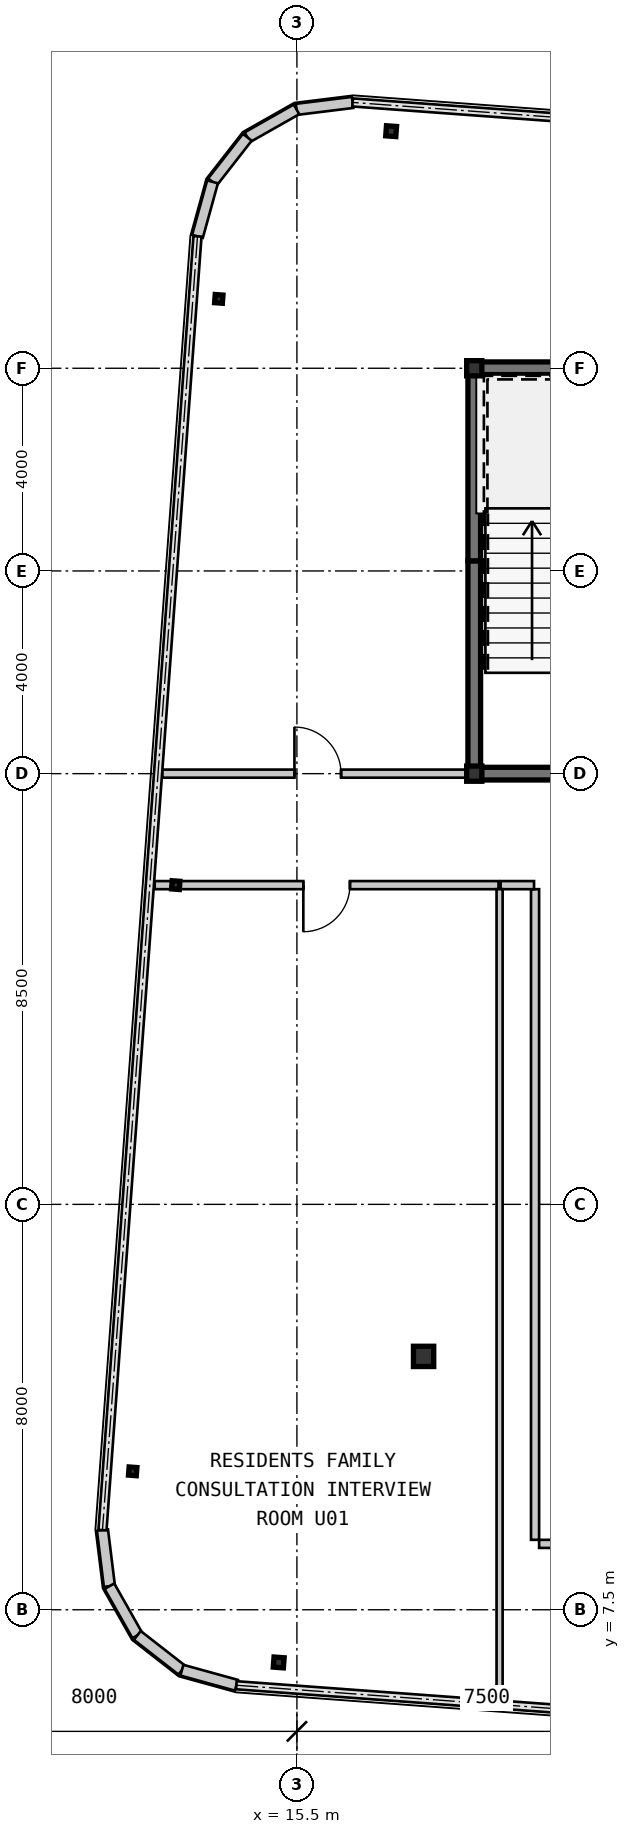
"""IFC4 building model, lengths in metres.
Left out: names, types, materials, properties, quantities, classifications, styles, units other than length and angle.
Written with IfcOpenShell. Run it as: python <this file> out.ifc"""

import sys

from ifc_helpers import new_model, si_unit, direction, frame, frame_2d, origin, origin_2d, place, context, subcontext, project, spatial, rectangle, hollow_rectangle, i_section, extrude, source, transform, mapped, element, fill, save


model = new_model("IFC4")
c1 = context("Model", 3, precision=1e-05, world=origin(), true_north=direction((0.0, 1.0)))
c2 = subcontext(c1, "Body", "Model", "MODEL_VIEW")
j1 = project(units=[si_unit("LENGTHUNIT", "METRE"), si_unit("PLANEANGLEUNIT", "RADIAN")], contexts=[c1])
p1 = place(None, origin())
s1 = spatial("IfcSite", under=j1, at=p1, CompositionType="ELEMENT")
p2 = place(p1, origin())
s2 = spatial("IfcBuilding", under=s1, at=p2, CompositionType="ELEMENT")
p3 = place(p2, frame((0.0, 0.0, 246.05)))
s3 = spatial("IfcBuildingStorey", under=s2, at=p3, CompositionType="ELEMENT", Elevation=246.05)
m1 = source(origin(), c2, "Body", "SweptSolid", [
    extrude(hollow_rectangle(XDim=0.3, YDim=0.3, WallThickness=0.012, at=origin_2d()), origin(), (0.0, 0.0, 1.0), 3.15),
])
for number, where, z_axis, x_axis in (
    (1, (19.0, 24.0, 0.0), (0.0, 0.0, 1.0), (1.0, 0.0, 0.0)),
    (2, (19.0, 32.0, 0.0), (0.0, 0.0, 1.0), (1.0, 0.0, 0.0)),
):
    element("IfcColumn", number, at=place(p3, frame(where, z_axis=z_axis, x_axis=x_axis)), inside=s3, PredefinedType="COLUMN", context=c2, shape_type="MappedRepresentation", body=[
        mapped(m1, transform((0.0, 0.0, 0.0), scale=1.0)),
    ])
m2 = source(origin(), c2, "Body", "SweptSolid", [
    extrude(hollow_rectangle(XDim=0.4, YDim=0.4, WallThickness=0.016, at=origin_2d()), origin(), (0.0, 0.0, 1.0), 3.15),
])
p4 = place(p3, frame((18.0, 12.5, 0.0), z_axis=(0.0, 0.0, 1.0), x_axis=(1.0, 0.0, 0.0)))
e3 = element("IfcColumn", 3, at=p4, inside=s3, PredefinedType="COLUMN", context=c2, shape_type="MappedRepresentation", body=[
    mapped(m2, transform((0.0, 0.0, 0.0), scale=1.0)),
])
m3 = source(origin(), c2, "Body", "SweptSolid", [
    extrude(hollow_rectangle(XDim=0.2, YDim=0.2, WallThickness=0.009, at=origin_2d()), origin(), (0.0, 0.0, 1.0), 3.15),
])
for number, where, z_axis, x_axis in (
    (4, (15.141, 6.46, 0.0), (0.0, 0.0, 1.0), (0.997, -0.073, 0.0)),
    (5, (17.36, 36.679, 0.0), (0.0, 0.0, 1.0), (0.997, -0.073, 0.0)),
):
    element("IfcColumn", number, at=place(p3, frame(where, z_axis=z_axis, x_axis=x_axis)), inside=s3, PredefinedType="COLUMN", context=c2, shape_type="MappedRepresentation", body=[
        mapped(m3, transform((0.0, 0.0, 0.0), scale=1.0)),
    ])
m4 = source(origin(), c2, "Body", "SweptSolid", [
    extrude(i_section(OverallWidth=0.154, OverallDepth=0.162, WebThickness=0.008, FlangeThickness=0.011, at=origin_2d()), origin(), (0.0, 0.0, 1.0), 3.15),
])
for number, where, z_axis, x_axis in (
    (6, (12.259, 10.231, 0.0), (0.0, 0.0, 1.0), (0.997, -0.073, 0.0)),
    (7, (13.109, 21.8, 0.0), (0.0, 0.0, 1.0), (0.997, -0.073, 0.0)),
    (8, (13.958, 33.369, 0.0), (0.0, 0.0, 1.0), (0.997, -0.073, 0.0)),
):
    element("IfcColumn", number, at=place(p3, frame(where, z_axis=z_axis, x_axis=x_axis)), inside=s3, PredefinedType="COLUMN", context=c2, shape_type="MappedRepresentation", body=[
        mapped(m4, transform((0.0, 0.0, 0.0), scale=1.0)),
    ])
m5 = source(origin(), c2, "Body", "SweptSolid", [
    extrude(rectangle(XDim=1.116, YDim=0.22, at=frame_2d((0.558, 0.0))), origin(), (0.0, 0.0, 1.0), 2.93),
])
p5 = place(p3, frame((16.599, 37.246, 0.0), z_axis=(0.0, 0.0, 1.0), x_axis=(-0.992441899189, -0.122715429897, 0.0)))
e9 = element("IfcWall", 9, at=p5, inside=s3, PredefinedType="SOLIDWALL", context=c2, shape_type="MappedRepresentation", body=[
    mapped(m5, transform((0.0, 0.0, 0.0), scale=1.0)),
])
m6 = source(origin(), c2, "Body", "SweptSolid", [
    extrude(rectangle(XDim=1.116, YDim=0.22, at=frame_2d((0.558, 0.0))), origin(), (0.0, 0.0, 1.0), 2.93),
])
p6 = place(p3, frame((15.492, 37.109, 0.0), z_axis=(0.0, 0.0, 1.0), x_axis=(-0.869934579941, -0.493167138628, 0.0)))
e10 = element("IfcWall", 10, at=p6, inside=s3, PredefinedType="SOLIDWALL", context=c2, shape_type="MappedRepresentation", body=[
    mapped(m6, transform((0.0, 0.0, 0.0), scale=1.0)),
])
m7 = source(origin(), c2, "Body", "SweptSolid", [
    extrude(rectangle(XDim=1.116, YDim=0.22, at=frame_2d((0.558, 0.0))), origin(), (0.0, 0.0, 1.0), 2.93),
])
p7 = place(p3, frame((14.521, 36.559, 0.0), z_axis=(0.0, 0.0, 1.0), x_axis=(-0.614909386406, -0.788597772321, 0.0)))
e11 = element("IfcWall", 11, at=p7, inside=s3, PredefinedType="SOLIDWALL", context=c2, shape_type="MappedRepresentation", body=[
    mapped(m7, transform((0.0, 0.0, 0.0), scale=1.0)),
])
p8 = place(p3, frame((13.835, 35.679, 0.0), z_axis=(0.0, 0.0, 1.0), x_axis=(-0.266300605026, -0.963890028874, 0.0)))
e12 = element("IfcWall", 12, at=p8, inside=s3, PredefinedType="SOLIDWALL", context=c2, shape_type="MappedRepresentation", body=[
    mapped(m6, transform((0.0, 0.0, 0.0), scale=1.0)),
])
for number, where, z_axis, x_axis in (
    (13, (11.663, 9.072, 0.0), (0.0, 0.0, 1.0), (0.123, -0.992, 0.0)),
    (14, (11.8, 7.965, 0.0), (0.0, 0.0, 1.0), (0.493, -0.87, 0.0)),
    (15, (12.35, 6.994, 0.0), (0.0, 0.0, 1.0), (0.789, -0.615, 0.0)),
):
    element("IfcWall", number, at=place(p3, frame(where, z_axis=z_axis, x_axis=x_axis)), inside=s3, PredefinedType="SOLIDWALL", context=c2, shape_type="MappedRepresentation", body=[
        mapped(m7, transform((0.0, 0.0, 0.0), scale=1.0)),
    ])
p9 = place(p3, frame((13.23, 6.307, 0.0), z_axis=(0.0, 0.0, 1.0), x_axis=(0.963890028874, -0.266300605026, 0.0)))
e16 = element("IfcWall", 16, at=p9, inside=s3, PredefinedType="SOLIDWALL", context=c2, shape_type="MappedRepresentation", body=[
    mapped(m6, transform((0.0, 0.0, 0.0), scale=1.0)),
])
m8 = source(origin(), c2, "Body", "SweptSolid", [
    extrude(rectangle(XDim=9.125, YDim=0.25, at=frame_2d((4.562, 0.0))), origin(), (0.0, 0.0, 1.0), 2.93),
])
p10 = place(p3, frame((18.875, 32.0, 0.0), z_axis=(0.0, 0.0, 1.0), x_axis=(1.0, 0.0, 0.0)))
e17 = element("IfcWall", 17, at=p10, inside=s3, PredefinedType="SHEAR", context=c2, shape_type="MappedRepresentation", body=[
    mapped(m8, transform((0.0, 0.0, 0.0), scale=1.0)),
])
m9 = source(origin(), c2, "Body", "SweptSolid", [
    extrude(rectangle(XDim=4.075, YDim=0.25, at=frame_2d((2.038, 0.0))), origin(), (0.0, 0.0, 1.0), 2.93),
])
p11 = place(p3, frame((19.0, 24.125, 0.0), z_axis=(0.0, 0.0, 1.0), x_axis=(0.0, 1.0, 0.0)))
e18 = element("IfcWall", 18, at=p11, inside=s3, PredefinedType="SHEAR", context=c2, shape_type="MappedRepresentation", body=[
    mapped(m9, transform((0.0, 0.0, 0.0), scale=1.0)),
])
m10 = source(origin(), c2, "Body", "SweptSolid", [
    extrude(rectangle(XDim=3.675, YDim=0.25, at=frame_2d((1.837, 0.0))), origin(), (0.0, 0.0, 1.0), 2.93),
])
p12 = place(p3, frame((19.0, 28.2, 0.0), z_axis=(0.0, 0.0, 1.0), x_axis=(0.0, 1.0, 0.0)))
e19 = element("IfcWall", 19, at=p12, inside=s3, PredefinedType="SHEAR", context=c2, shape_type="MappedRepresentation", body=[
    mapped(m10, transform((0.0, 0.0, 0.0), scale=1.0)),
])
m11 = source(origin(), c2, "Body", "SweptSolid", [
    extrude(rectangle(XDim=4.85, YDim=0.25, at=frame_2d((2.425, 0.0))), origin(), (0.0, 0.0, 1.0), 2.93),
])
p13 = place(p3, frame((18.875, 24.0, 0.0), z_axis=(0.0, 0.0, 1.0), x_axis=(1.0, 0.0, 0.0)))
e20 = element("IfcWall", 20, at=p13, inside=s3, PredefinedType="SHEAR", context=c2, shape_type="MappedRepresentation", body=[
    mapped(m11, transform((0.0, 0.0, 0.0), scale=1.0)),
])
m12 = source(origin(), c2, "Body", "SweptSolid", [
    extrude(rectangle(XDim=6.032, YDim=0.16, at=frame_2d((3.016, 0.0))), origin(), (0.0, 0.0, 1.0), 2.93),
])
p14 = place(p3, frame((12.843, 24.0, 0.0), z_axis=(0.0, 0.0, 1.0), x_axis=(1.0, 0.0, 0.0)))
e21 = element("IfcWall", 21, at=p14, inside=s3, PredefinedType="PARTITIONING", context=c2, shape_type="MappedRepresentation", body=[
    mapped(m12, transform((0.0, 0.0, 0.0), scale=1.0)),
])
m13 = source(origin(), c2, "Body", "SweptSolid", [
    extrude(rectangle(XDim=0.92, YDim=2.1, at=frame_2d((0.46, 1.05))), frame((0.0, 0.09, 0.0), z_axis=(0.0, -1.0, 0.0), x_axis=(1.0, 0.0, 0.0)), (0.0, 0.0, 1.0), 0.18),
])
p15 = place(p14, frame((2.608, 0.0, 0.0)))
e22 = element("IfcOpeningElement", 22, at=p15, cuts=e21, PredefinedType="OPENING", context=c2, shape_type="MappedRepresentation", body=[
    mapped(m13, transform((0.0, 0.0, 0.0), scale=1.0)),
])
m14 = source(origin(), c2, "Body", "SweptSolid", [
    extrude(rectangle(XDim=6.786, YDim=0.16, at=frame_2d((3.393, 0.0))), origin(), (0.0, 0.0, 1.0), 2.93),
])
p16 = place(p3, frame((19.48, 21.8, 0.0), z_axis=(0.0, 0.0, 1.0), x_axis=(-1.0, 0.0, 0.0)))
e23 = element("IfcWall", 23, at=p16, inside=s3, PredefinedType="PARTITIONING", context=c2, shape_type="MappedRepresentation", body=[
    mapped(m14, transform((0.0, 0.0, 0.0), scale=1.0)),
])
p17 = place(p16, frame((2.933, 0.0, 0.0)))
e24 = element("IfcOpeningElement", 24, at=p17, cuts=e23, PredefinedType="OPENING", context=c2, shape_type="MappedRepresentation", body=[
    mapped(m13, transform((0.0, 0.0, 0.0), scale=1.0)),
])
m15 = source(origin(), c2, "Body", "SweptSolid", [
    extrude(rectangle(XDim=12.84, YDim=0.16, at=frame_2d((6.42, 0.0))), origin(), (0.0, 0.0, 1.0), 2.93),
])
p18 = place(p3, frame((20.2, 8.88, 0.0), z_axis=(0.0, 0.0, 1.0), x_axis=(0.0, 1.0, 0.0)))
e25 = element("IfcWall", 25, at=p18, inside=s3, PredefinedType="PARTITIONING", context=c2, shape_type="MappedRepresentation", body=[
    mapped(m15, transform((0.0, 0.0, 0.0), scale=1.0)),
])
m16 = source(origin(), c2, "Body", "SweptSolid", [
    extrude(rectangle(XDim=2.04, YDim=0.16, at=frame_2d((1.02, 0.0))), origin(), (0.0, 0.0, 1.0), 2.93),
])
p19 = place(p3, frame((22.32, 8.8, 0.0), z_axis=(0.0, 0.0, 1.0), x_axis=(-1.0, 0.0, 0.0)))
e26 = element("IfcWall", 26, at=p19, inside=s3, PredefinedType="PARTITIONING", context=c2, shape_type="MappedRepresentation", body=[
    mapped(m16, transform((0.0, 0.0, 0.0), scale=1.0)),
])
m17 = source(origin(), c2, "Body", "SweptSolid", [
    extrude(rectangle(XDim=0.659, YDim=0.16, at=frame_2d((0.33, 0.0))), origin(), (0.0, 0.0, 1.0), 2.93),
])
p20 = place(p3, frame((20.18, 21.8, 0.0), z_axis=(0.0, 0.0, 1.0), x_axis=(-1.0, 0.0, 0.0)))
e27 = element("IfcWall", 27, at=p20, inside=s3, PredefinedType="PARTITIONING", context=c2, shape_type="MappedRepresentation", body=[
    mapped(m17, transform((0.0, 0.0, 0.0), scale=1.0)),
])
m18 = source(origin(), c2, "Body", "SweptSolid", [
    extrude(rectangle(XDim=15.995, YDim=0.12, at=frame_2d((7.998, 0.0))), origin(), (0.0, 0.0, 1.0), 2.93),
])
p21 = place(p3, frame((19.5, 21.72, 0.0), z_axis=(0.0, 0.0, 1.0), x_axis=(0.0, -1.0, 0.0)))
e28 = element("IfcWall", 28, at=p21, inside=s3, PredefinedType="PARTITIONING", context=c2, shape_type="MappedRepresentation", body=[
    mapped(m18, transform((0.0, 0.0, 0.0), scale=1.0)),
])
m19 = source(origin(), c2, "Body", "SweptSolid", [
    extrude(rectangle(XDim=0.92, YDim=2.1, at=frame_2d((0.46, 1.05))), frame((0.0, 0.025, 0.0), z_axis=(0.0, -1.0, 0.0), x_axis=(1.0, 0.0, 0.0)), (0.0, 0.0, 1.0), 0.05),
])
p22 = place(p15, origin())
e29 = element("IfcDoor", 29, at=p22, inside=s3, OperationType="SINGLE_SWING_LEFT", PredefinedType="DOOR", context=c2, shape_type="MappedRepresentation", body=[
    mapped(m19, transform((0.0, 0.0, 0.0), scale=1.0)),
])
fill(e22, e29)
p23 = place(p17, origin())
e30 = element("IfcDoor", 30, at=p23, inside=s3, OperationType="SINGLE_SWING_RIGHT", PredefinedType="DOOR", context=c2, shape_type="MappedRepresentation", body=[
    mapped(m19, transform((0.0, 0.0, 0.0), scale=1.0)),
])
fill(e24, e30)
save(model, sys.argv[1])
